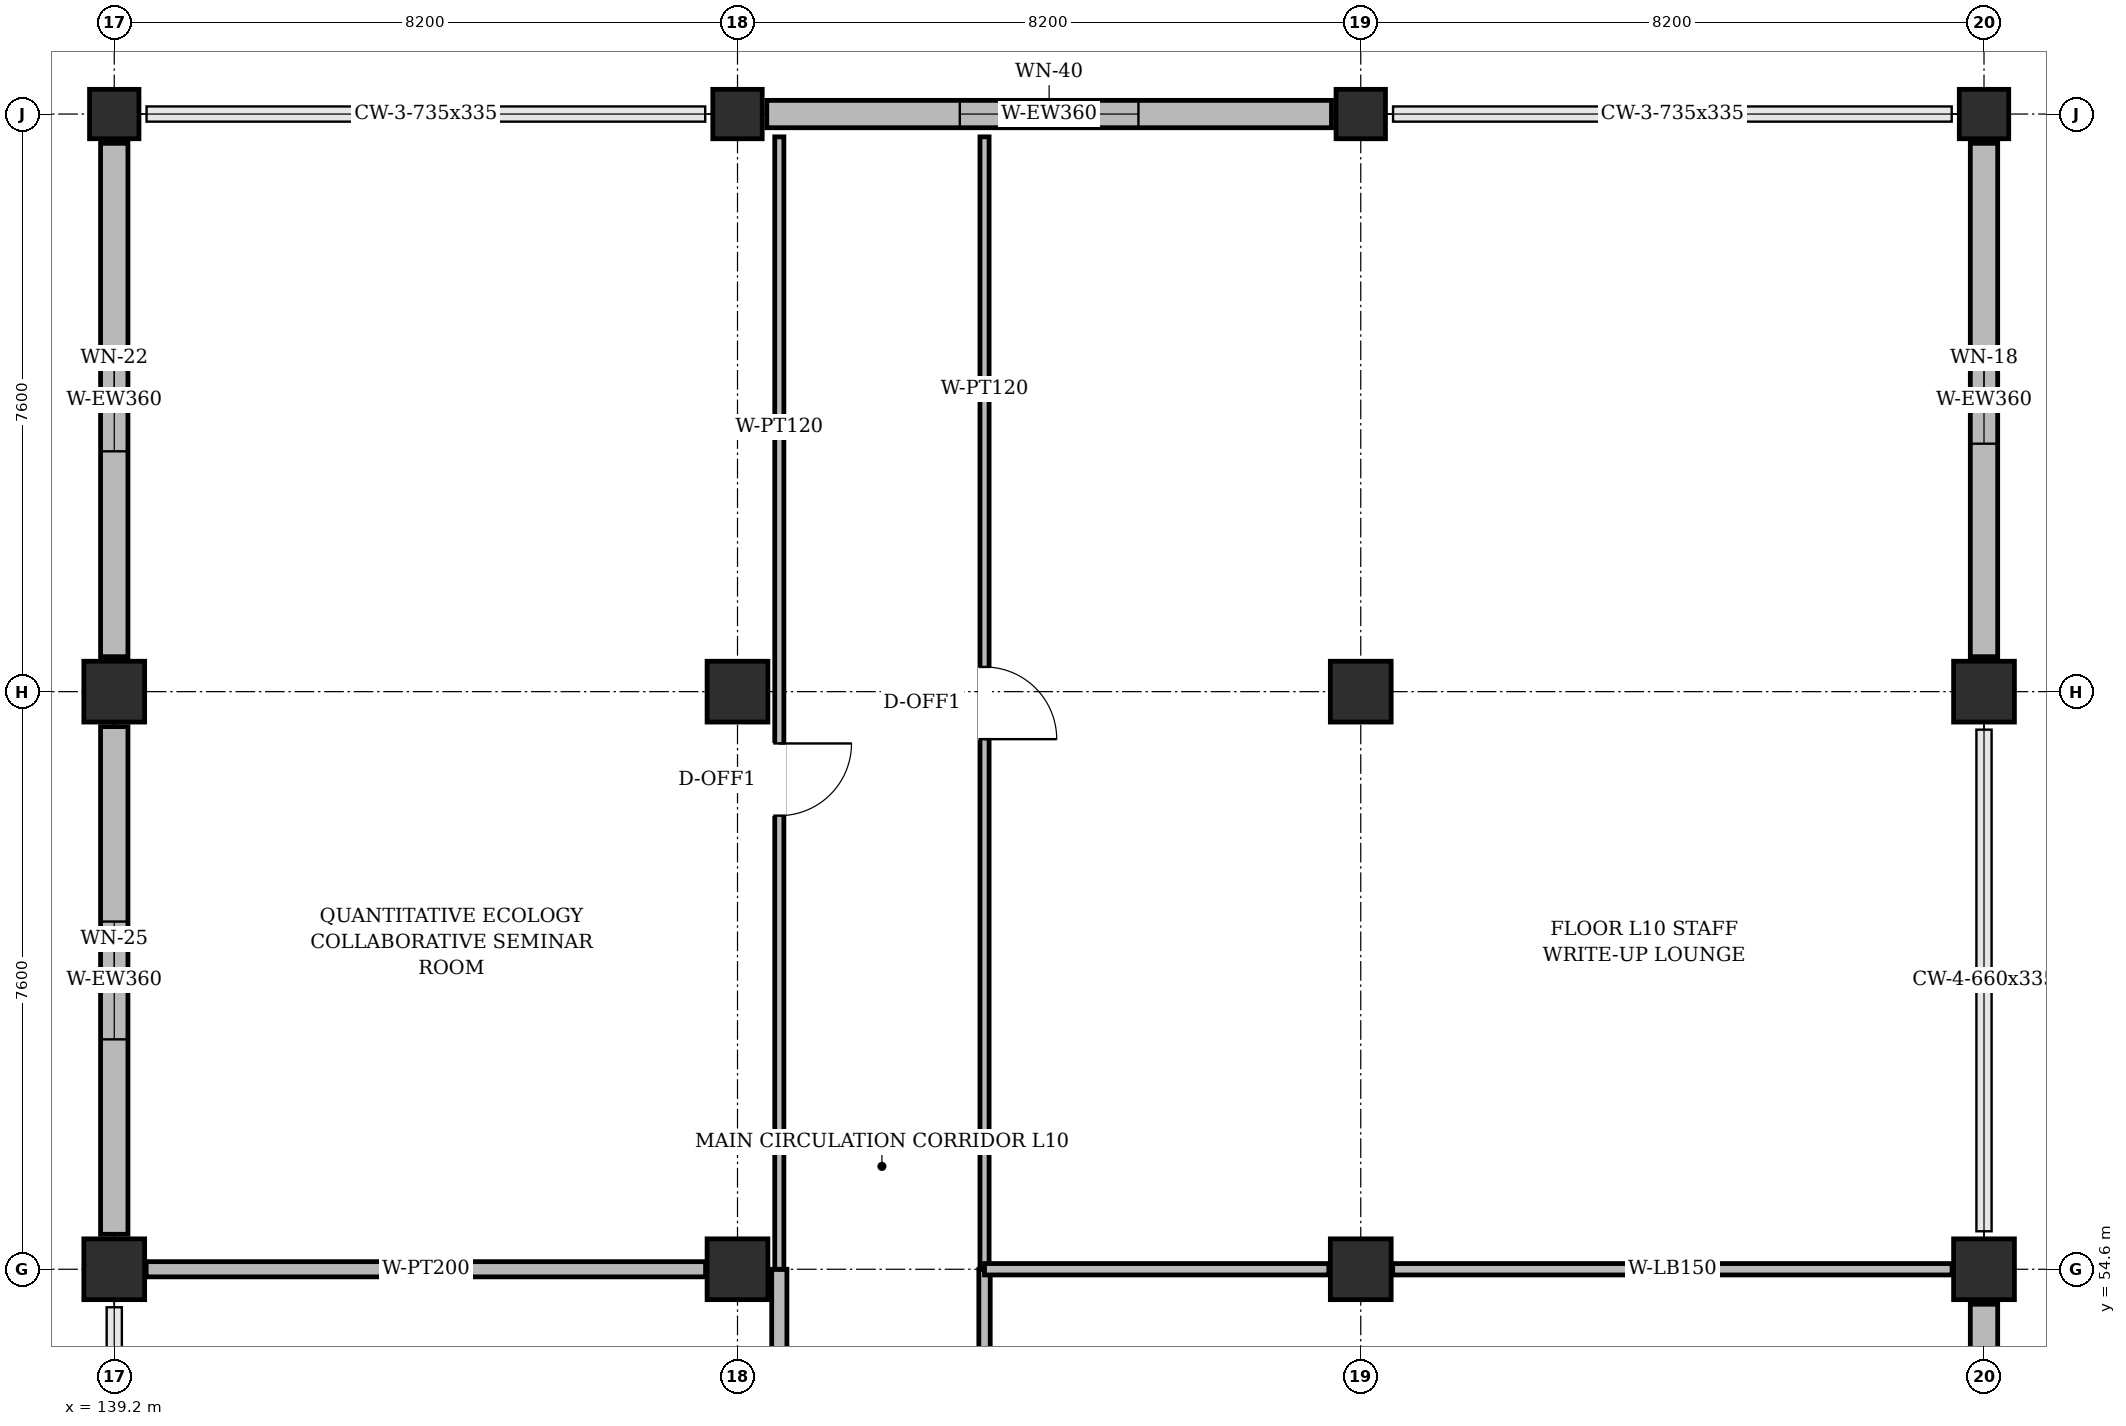
"""IFC4 building model, lengths in metres.
Left out: names, types, materials, properties, quantities, classifications, styles, units other than length and angle.
Written with IfcOpenShell. Run it as: python <this file> out.ifc"""

import sys

from ifc_helpers import new_model, si_unit, direction, frame, frame_2d, origin, origin_2d, place, context, subcontext, project, spatial, rectangle, extrude, element, fill, save


model = new_model("IFC4")
c1 = context("Model", 3, precision=1e-05, world=origin(), true_north=direction((0.0, 1.0)))
c2 = subcontext(c1, "Body", "Model", "MODEL_VIEW")
j1 = project(units=[si_unit("LENGTHUNIT", "METRE"), si_unit("PLANEANGLEUNIT", "RADIAN")], contexts=[c1])
p1 = place(None, origin())
s1 = spatial("IfcSite", under=j1, at=p1, CompositionType="ELEMENT")
p2 = place(p1, origin())
s2 = spatial("IfcBuilding", under=s1, at=p2, CompositionType="ELEMENT")
p3 = place(p2, frame((0.0, 0.0, 45.0)))
s3 = spatial("IfcBuildingStorey", under=s2, at=p3, CompositionType="ELEMENT", Elevation=45.0)
for number, where, z_axis, x_axis in (
    (1, (139.2, 54.6, 0.0), (0.0, 0.0, 1.0), (1.0, 0.0, 0.0)),
    (2, (139.2, 62.2, 0.0), (0.0, 0.0, 1.0), (1.0, 0.0, 0.0)),
):
    element("IfcColumn", number, at=place(p3, frame(where, z_axis=z_axis, x_axis=x_axis)), inside=s3, PredefinedType="COLUMN", context=c2, shape_type="SweptSolid", body=[
        extrude(rectangle(XDim=0.8, YDim=0.8, at=origin_2d()), origin(), (0.0, 0.0, 1.0), 3.95),
    ])
p4 = place(p3, frame((139.2, 69.8, 0.0), z_axis=(0.0, 0.0, 1.0), x_axis=(1.0, 0.0, 0.0)))
e3 = element("IfcColumn", 3, at=p4, inside=s3, PredefinedType="COLUMN", context=c2, shape_type="SweptSolid", body=[
    extrude(rectangle(XDim=0.65, YDim=0.65, at=origin_2d()), origin(), (0.0, 0.0, 1.0), 3.95),
])
for number, where, z_axis, x_axis in (
    (4, (147.4, 54.6, 0.0), (0.0, 0.0, 1.0), (1.0, 0.0, 0.0)),
    (5, (147.4, 62.2, 0.0), (0.0, 0.0, 1.0), (1.0, 0.0, 0.0)),
):
    element("IfcColumn", number, at=place(p3, frame(where, z_axis=z_axis, x_axis=x_axis)), inside=s3, PredefinedType="COLUMN", context=c2, shape_type="SweptSolid", body=[
        extrude(rectangle(XDim=0.8, YDim=0.8, at=origin_2d()), origin(), (0.0, 0.0, 1.0), 3.95),
    ])
p5 = place(p3, frame((147.4, 69.8, 0.0), z_axis=(0.0, 0.0, 1.0), x_axis=(1.0, 0.0, 0.0)))
e6 = element("IfcColumn", 6, at=p5, inside=s3, PredefinedType="COLUMN", context=c2, shape_type="SweptSolid", body=[
    extrude(rectangle(XDim=0.65, YDim=0.65, at=origin_2d()), origin(), (0.0, 0.0, 1.0), 3.95),
])
for number, where, z_axis, x_axis in (
    (7, (155.6, 54.6, 0.0), (0.0, 0.0, 1.0), (1.0, 0.0, 0.0)),
    (8, (155.6, 62.2, 0.0), (0.0, 0.0, 1.0), (1.0, 0.0, 0.0)),
):
    element("IfcColumn", number, at=place(p3, frame(where, z_axis=z_axis, x_axis=x_axis)), inside=s3, PredefinedType="COLUMN", context=c2, shape_type="SweptSolid", body=[
        extrude(rectangle(XDim=0.8, YDim=0.8, at=origin_2d()), origin(), (0.0, 0.0, 1.0), 3.95),
    ])
p6 = place(p3, frame((155.6, 69.8, 0.0), z_axis=(0.0, 0.0, 1.0), x_axis=(1.0, 0.0, 0.0)))
e9 = element("IfcColumn", 9, at=p6, inside=s3, PredefinedType="COLUMN", context=c2, shape_type="SweptSolid", body=[
    extrude(rectangle(XDim=0.65, YDim=0.65, at=origin_2d()), origin(), (0.0, 0.0, 1.0), 3.95),
])
for number, where, z_axis, x_axis in (
    (10, (163.8, 54.6, 0.0), (0.0, 0.0, 1.0), (1.0, 0.0, 0.0)),
    (11, (163.8, 62.2, 0.0), (0.0, 0.0, 1.0), (1.0, 0.0, 0.0)),
):
    element("IfcColumn", number, at=place(p3, frame(where, z_axis=z_axis, x_axis=x_axis)), inside=s3, PredefinedType="COLUMN", context=c2, shape_type="SweptSolid", body=[
        extrude(rectangle(XDim=0.8, YDim=0.8, at=origin_2d()), origin(), (0.0, 0.0, 1.0), 3.95),
    ])
p7 = place(p3, frame((163.8, 69.8, 0.0), z_axis=(0.0, 0.0, 1.0), x_axis=(1.0, 0.0, 0.0)))
e12 = element("IfcColumn", 12, at=p7, inside=s3, PredefinedType="COLUMN", context=c2, shape_type="SweptSolid", body=[
    extrude(rectangle(XDim=0.65, YDim=0.65, at=origin_2d()), origin(), (0.0, 0.0, 1.0), 3.95),
])
p8 = place(p3, frame((163.8, 47.46, 0.0), z_axis=(0.0, 0.0, 1.0), x_axis=(0.0, 1.0, 0.0)))
e13 = element("IfcWall", 13, at=p8, inside=s3, PredefinedType="SOLIDWALL", context=c2, shape_type="SweptSolid", body=[
    extrude(rectangle(XDim=6.68, YDim=0.36, at=frame_2d((3.34, 0.0))), origin(), (0.0, 0.0, 1.0), 3.335),
])
p9 = place(p8, frame((2.515, 0.0, 0.95)))
e14 = element("IfcOpeningElement", 14, at=p9, cuts=e13, PredefinedType="OPENING", context=c2, shape_type="SweptSolid", body=[
    extrude(rectangle(XDim=1.65, YDim=2.0, at=frame_2d((0.825, 1.0))), frame((0.0, 0.192, 0.0), z_axis=(0.0, -1.0, 0.0), x_axis=(1.0, 0.0, 0.0)), (0.0, 0.0, 1.0), 0.384),
])
p10 = place(p3, frame((163.8, 62.66, 0.0), z_axis=(0.0, 0.0, 1.0), x_axis=(0.0, 1.0, 0.0)))
e15 = element("IfcWall", 15, at=p10, inside=s3, PredefinedType="SOLIDWALL", context=c2, shape_type="SweptSolid", body=[
    extrude(rectangle(XDim=6.755, YDim=0.36, at=frame_2d((3.377, 0.0))), origin(), (0.0, 0.0, 1.0), 3.335),
])
p11 = place(p10, frame((2.802, 0.0, 0.95)))
e16 = element("IfcOpeningElement", 16, at=p11, cuts=e15, PredefinedType="OPENING", context=c2, shape_type="SweptSolid", body=[
    extrude(rectangle(XDim=1.15, YDim=1.5, at=frame_2d((0.575, 0.75))), frame((0.0, 0.192, 0.0), z_axis=(0.0, -1.0, 0.0), x_axis=(1.0, 0.0, 0.0)), (0.0, 0.0, 1.0), 0.384),
])
p12 = place(p3, frame((155.215, 69.8, 0.0), z_axis=(0.0, 0.0, 1.0), x_axis=(-1.0, 0.0, 0.0)))
e17 = element("IfcWall", 17, at=p12, inside=s3, PredefinedType="SOLIDWALL", context=c2, shape_type="SweptSolid", body=[
    extrude(rectangle(XDim=7.43, YDim=0.36, at=frame_2d((3.715, 0.0))), origin(), (0.0, 0.0, 1.0), 3.335),
])
p13 = place(p12, frame((2.54, 0.0, 0.95)))
e18 = element("IfcOpeningElement", 18, at=p13, cuts=e17, PredefinedType="OPENING", context=c2, shape_type="SweptSolid", body=[
    extrude(rectangle(XDim=2.35, YDim=2.05, at=frame_2d((1.175, 1.025))), frame((0.0, 0.192, 0.0), z_axis=(0.0, -1.0, 0.0), x_axis=(1.0, 0.0, 0.0)), (0.0, 0.0, 1.0), 0.384),
])
p14 = place(p3, frame((139.2, 69.415, 0.0), z_axis=(0.0, 0.0, 1.0), x_axis=(0.0, -1.0, 0.0)))
e19 = element("IfcWall", 19, at=p14, inside=s3, PredefinedType="SOLIDWALL", context=c2, shape_type="SweptSolid", body=[
    extrude(rectangle(XDim=6.755, YDim=0.36, at=frame_2d((3.377, 0.0))), origin(), (0.0, 0.0, 1.0), 3.335),
])
p15 = place(p14, frame((2.702, 0.0, 0.95)))
e20 = element("IfcOpeningElement", 20, at=p15, cuts=e19, PredefinedType="OPENING", context=c2, shape_type="SweptSolid", body=[
    extrude(rectangle(XDim=1.35, YDim=1.5, at=frame_2d((0.675, 0.75))), frame((0.0, 0.192, 0.0), z_axis=(0.0, -1.0, 0.0), x_axis=(1.0, 0.0, 0.0)), (0.0, 0.0, 1.0), 0.384),
])
p16 = place(p3, frame((139.2, 61.74, 0.0), z_axis=(0.0, 0.0, 1.0), x_axis=(0.0, -1.0, 0.0)))
e21 = element("IfcWall", 21, at=p16, inside=s3, PredefinedType="SOLIDWALL", context=c2, shape_type="SweptSolid", body=[
    extrude(rectangle(XDim=6.68, YDim=0.36, at=frame_2d((3.34, 0.0))), origin(), (0.0, 0.0, 1.0), 3.335),
])
p17 = place(p16, frame((2.565, 0.0, 0.95)))
e22 = element("IfcOpeningElement", 22, at=p17, cuts=e21, PredefinedType="OPENING", context=c2, shape_type="SweptSolid", body=[
    extrude(rectangle(XDim=1.55, YDim=1.25, at=frame_2d((0.775, 0.625))), frame((0.0, 0.192, 0.0), z_axis=(0.0, -1.0, 0.0), x_axis=(1.0, 0.0, 0.0)), (0.0, 0.0, 1.0), 0.384),
])
p18 = place(p3, frame((150.65, 54.6, 0.0), z_axis=(0.0, 0.0, 1.0), x_axis=(0.0, -1.0, 0.0)))
e23 = element("IfcWall", 23, at=p18, inside=s3, PredefinedType="PARTITIONING", context=c2, shape_type="SweptSolid", body=[
    extrude(rectangle(XDim=18.35, YDim=0.15, at=frame_2d((9.175, 0.0))), origin(), (0.0, 0.0, 1.0), 3.805),
])
p19 = place(p18, frame((8.475, 0.0, 0.0)))
e24 = element("IfcOpeningElement", 24, at=p19, cuts=e23, PredefinedType="OPENING", context=c2, shape_type="SweptSolid", body=[
    extrude(rectangle(XDim=1.4, YDim=2.2, at=frame_2d((0.7, 1.1))), frame((0.0, 0.087, 0.0), z_axis=(0.0, -1.0, 0.0), x_axis=(1.0, 0.0, 0.0)), (0.0, 0.0, 1.0), 0.174),
])
p20 = place(p3, frame((147.95, 46.51, 0.0), z_axis=(0.0, 0.0, 1.0), x_axis=(0.0, 1.0, 0.0)))
e25 = element("IfcWall", 25, at=p20, inside=s3, PredefinedType="PARTITIONING", context=c2, shape_type="SweptSolid", body=[
    extrude(rectangle(XDim=8.09, YDim=0.2, at=frame_2d((4.045, 0.0))), origin(), (0.0, 0.0, 1.0), 3.805),
])
p21 = place(p20, frame((3.245, 0.0, 0.0)))
e26 = element("IfcOpeningElement", 26, at=p21, cuts=e25, PredefinedType="OPENING", context=c2, shape_type="SweptSolid", body=[
    extrude(rectangle(XDim=1.6, YDim=2.3, at=frame_2d((0.8, 1.15))), frame((0.0, 0.112, 0.0), z_axis=(0.0, -1.0, 0.0), x_axis=(1.0, 0.0, 0.0)), (0.0, 0.0, 1.0), 0.224),
])
p22 = place(p3, frame((147.95, 54.6, 0.0), z_axis=(0.0, 0.0, 1.0), x_axis=(0.0, 1.0, 0.0)))
e27 = element("IfcWall", 27, at=p22, inside=s3, PredefinedType="PARTITIONING", context=c2, shape_type="SweptSolid", body=[
    extrude(rectangle(XDim=14.9, YDim=0.12, at=frame_2d((7.45, 0.0))), origin(), (0.0, 0.0, 1.0), 3.805),
])
p23 = place(p22, frame((5.968, 0.0, 0.0)))
e28 = element("IfcOpeningElement", 28, at=p23, cuts=e27, PredefinedType="OPENING", context=c2, shape_type="SweptSolid", body=[
    extrude(rectangle(XDim=0.95, YDim=2.2, at=frame_2d((0.475, 1.1))), frame((0.0, 0.072, 0.0), z_axis=(0.0, -1.0, 0.0), x_axis=(1.0, 0.0, 0.0)), (0.0, 0.0, 1.0), 0.144),
])
p24 = place(p3, frame((150.65, 69.5, 0.0), z_axis=(0.0, 0.0, 1.0), x_axis=(0.0, -1.0, 0.0)))
e29 = element("IfcWall", 29, at=p24, inside=s3, PredefinedType="PARTITIONING", context=c2, shape_type="SweptSolid", body=[
    extrude(rectangle(XDim=14.9, YDim=0.12, at=frame_2d((7.45, 0.0))), origin(), (0.0, 0.0, 1.0), 3.805),
])
p25 = place(p24, frame((6.975, 0.0, 0.0)))
e30 = element("IfcOpeningElement", 30, at=p25, cuts=e29, PredefinedType="OPENING", context=c2, shape_type="SweptSolid", body=[
    extrude(rectangle(XDim=0.95, YDim=2.2, at=frame_2d((0.475, 1.1))), frame((0.0, 0.072, 0.0), z_axis=(0.0, -1.0, 0.0), x_axis=(1.0, 0.0, 0.0)), (0.0, 0.0, 1.0), 0.144),
])
p26 = place(p3, frame((150.65, 54.6, 0.0), z_axis=(0.0, 0.0, 1.0), x_axis=(1.0, 0.0, 0.0)))
e31 = element("IfcWall", 31, at=p26, inside=s3, PredefinedType="PARTITIONING", context=c2, shape_type="SweptSolid", body=[
    extrude(rectangle(XDim=4.53, YDim=0.15, at=frame_2d((2.265, 0.0))), origin(), (0.0, 0.0, 1.0), 3.285),
])
p27 = place(p3, frame((156.02, 54.6, 0.0), z_axis=(0.0, 0.0, 1.0), x_axis=(1.0, 0.0, 0.0)))
e32 = element("IfcWall", 32, at=p27, inside=s3, PredefinedType="PARTITIONING", context=c2, shape_type="SweptSolid", body=[
    extrude(rectangle(XDim=7.36, YDim=0.15, at=frame_2d((3.68, 0.0))), origin(), (0.0, 0.0, 1.0), 3.285),
])
p28 = place(p3, frame((139.62, 54.6, 0.0), z_axis=(0.0, 0.0, 1.0), x_axis=(1.0, 0.0, 0.0)))
e33 = element("IfcWall", 33, at=p28, inside=s3, PredefinedType="PARTITIONING", context=c2, shape_type="SweptSolid", body=[
    extrude(rectangle(XDim=7.36, YDim=0.2, at=frame_2d((3.68, 0.0))), origin(), (0.0, 0.0, 1.0), 3.285),
])
p29 = place(p11, origin())
e34 = element("IfcWindow", 34, at=p29, inside=s3, PartitioningType="SINGLE_PANEL", PredefinedType="WINDOW", context=c2, shape_type="SweptSolid", body=[
    extrude(rectangle(XDim=1.15, YDim=1.5, at=frame_2d((0.575, 0.75))), frame((0.0, 0.03, 0.0), z_axis=(0.0, -1.0, 0.0), x_axis=(1.0, 0.0, 0.0)), (0.0, 0.0, 1.0), 0.06),
])
fill(e16, e34)
p30 = place(p13, origin())
e35 = element("IfcWindow", 35, at=p30, inside=s3, PartitioningType="DOUBLE_PANEL_VERTICAL", PredefinedType="WINDOW", context=c2, shape_type="SweptSolid", body=[
    extrude(rectangle(XDim=2.35, YDim=2.05, at=frame_2d((1.175, 1.025))), frame((0.0, 0.03, 0.0), z_axis=(0.0, -1.0, 0.0), x_axis=(1.0, 0.0, 0.0)), (0.0, 0.0, 1.0), 0.06),
])
fill(e18, e35)
p31 = place(p15, origin())
e36 = element("IfcWindow", 36, at=p31, inside=s3, PartitioningType="SINGLE_PANEL", PredefinedType="WINDOW", context=c2, shape_type="SweptSolid", body=[
    extrude(rectangle(XDim=1.35, YDim=1.5, at=frame_2d((0.675, 0.75))), frame((0.0, 0.03, 0.0), z_axis=(0.0, -1.0, 0.0), x_axis=(1.0, 0.0, 0.0)), (0.0, 0.0, 1.0), 0.06),
])
fill(e20, e36)
p32 = place(p17, origin())
e37 = element("IfcWindow", 37, at=p32, inside=s3, PartitioningType="DOUBLE_PANEL_VERTICAL", PredefinedType="WINDOW", context=c2, shape_type="SweptSolid", body=[
    extrude(rectangle(XDim=1.55, YDim=1.25, at=frame_2d((0.775, 0.625))), frame((0.0, 0.03, 0.0), z_axis=(0.0, -1.0, 0.0), x_axis=(1.0, 0.0, 0.0)), (0.0, 0.0, 1.0), 0.06),
])
fill(e22, e37)
p33 = place(p23, frame((0.95, 0.0, 0.0), z_axis=(0.0, 0.0, 1.0), x_axis=(-1.0, 0.0, 0.0)))
e38 = element("IfcDoor", 38, at=p33, inside=s3, OperationType="SINGLE_SWING_LEFT", PredefinedType="DOOR", context=c2, shape_type="SweptSolid", body=[
    extrude(rectangle(XDim=0.95, YDim=2.2, at=frame_2d((0.475, 1.1))), frame((0.0, 0.025, 0.0), z_axis=(0.0, -1.0, 0.0), x_axis=(1.0, 0.0, 0.0)), (0.0, 0.0, 1.0), 0.05),
])
fill(e28, e38)
p34 = place(p25, origin())
e39 = element("IfcDoor", 39, at=p34, inside=s3, OperationType="SINGLE_SWING_RIGHT", PredefinedType="DOOR", context=c2, shape_type="SweptSolid", body=[
    extrude(rectangle(XDim=0.95, YDim=2.2, at=frame_2d((0.475, 1.1))), frame((0.0, 0.025, 0.0), z_axis=(0.0, -1.0, 0.0), x_axis=(1.0, 0.0, 0.0)), (0.0, 0.0, 1.0), 0.05),
])
fill(e30, e39)
save(model, sys.argv[1])
